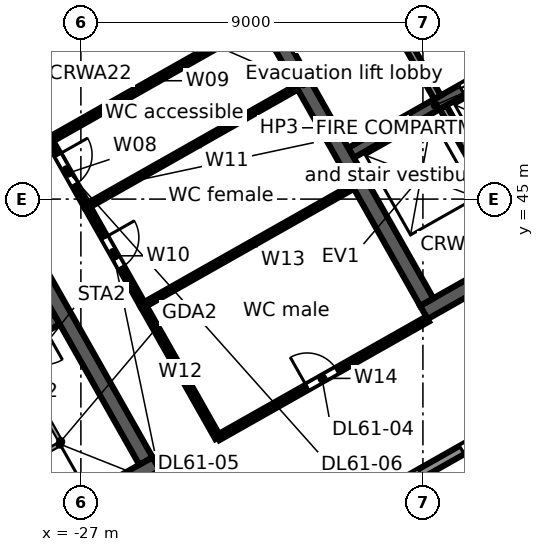
"""IFC4 building model, lengths in metres.
Left out: names, types, materials, properties, quantities, classifications, styles, units other than length and angle.
Written with IfcOpenShell. Run it as: python <this file> out.ifc"""

import sys

from ifc_helpers import new_model, si_unit, direction, frame, frame_2d, origin, place, context, subcontext, project, spatial, rectangle, extrude, element, fill, save


model = new_model("IFC4")
c1 = context("Model", 3, precision=1e-05, world=origin(), true_north=direction((0.0, 1.0)))
c2 = subcontext(c1, "Body", "Model", "MODEL_VIEW")
j1 = project(units=[si_unit("LENGTHUNIT", "METRE"), si_unit("PLANEANGLEUNIT", "RADIAN")], contexts=[c1])
p1 = place(None, origin())
s1 = spatial("IfcSite", under=j1, at=p1, CompositionType="ELEMENT")
p2 = place(p1, origin())
s2 = spatial("IfcBuilding", under=s1, at=p2, CompositionType="ELEMENT")
p3 = place(p2, frame((0.0, 0.0, 281.7)))
s3 = spatial("IfcBuildingStorey", under=s2, at=p3, CompositionType="ELEMENT", Elevation=281.7)
p4 = place(p3, frame((-58.732, 38.771, 0.0), z_axis=(0.0, 0.0, 1.0), x_axis=(0.870355615581, 0.492423702137, 0.0)))
e1 = element("IfcWall", 1, at=p4, inside=s3, PredefinedType="STANDARD", context=c2, shape_type="SweptSolid", body=[
    extrude(rectangle(XDim=64.052, YDim=0.25, at=frame_2d((32.026, 0.0))), origin(), (0.0, 0.0, 1.0), 3.45),
])
p5 = place(p4, frame((61.259, 0.0, 0.8)))
e2 = element("IfcOpeningElement", 2, at=p5, cuts=e1, PredefinedType="OPENING", context=c2, shape_type="SweptSolid", body=[
    extrude(rectangle(XDim=2.4, YDim=2.2, at=frame_2d((1.2, 1.1))), frame((0.0, 0.135, 0.0), z_axis=(0.0, -1.0, 0.0), x_axis=(1.0, 0.0, 0.0)), (0.0, 0.0, 1.0), 0.27),
])
p6 = place(p4, frame((58.216, 0.0, 0.8)))
e3 = element("IfcOpeningElement", 3, at=p6, cuts=e1, PredefinedType="OPENING", context=c2, shape_type="SweptSolid", body=[
    extrude(rectangle(XDim=2.4, YDim=2.2, at=frame_2d((1.2, 1.1))), frame((0.0, 0.135, 0.0), z_axis=(0.0, -1.0, 0.0), x_axis=(1.0, 0.0, 0.0)), (0.0, 0.0, 1.0), 0.27),
])
p7 = place(p4, frame((55.173, 0.0, 0.8)))
e4 = element("IfcOpeningElement", 4, at=p7, cuts=e1, PredefinedType="OPENING", context=c2, shape_type="SweptSolid", body=[
    extrude(rectangle(XDim=2.4, YDim=2.2, at=frame_2d((1.2, 1.1))), frame((0.0, 0.135, 0.0), z_axis=(0.0, -1.0, 0.0), x_axis=(1.0, 0.0, 0.0)), (0.0, 0.0, 1.0), 0.27),
])
p8 = place(p4, frame((52.129, 0.0, 0.8)))
e5 = element("IfcOpeningElement", 5, at=p8, cuts=e1, PredefinedType="OPENING", context=c2, shape_type="SweptSolid", body=[
    extrude(rectangle(XDim=2.4, YDim=2.2, at=frame_2d((1.2, 1.1))), frame((0.0, 0.135, 0.0), z_axis=(0.0, -1.0, 0.0), x_axis=(1.0, 0.0, 0.0)), (0.0, 0.0, 1.0), 0.27),
])
p9 = place(p4, frame((49.086, 0.0, 0.8)))
e6 = element("IfcOpeningElement", 6, at=p9, cuts=e1, PredefinedType="OPENING", context=c2, shape_type="SweptSolid", body=[
    extrude(rectangle(XDim=2.4, YDim=2.2, at=frame_2d((1.2, 1.1))), frame((0.0, 0.135, 0.0), z_axis=(0.0, -1.0, 0.0), x_axis=(1.0, 0.0, 0.0)), (0.0, 0.0, 1.0), 0.27),
])
p10 = place(p4, frame((46.043, 0.0, 0.8)))
e7 = element("IfcOpeningElement", 7, at=p10, cuts=e1, PredefinedType="OPENING", context=c2, shape_type="SweptSolid", body=[
    extrude(rectangle(XDim=2.4, YDim=2.2, at=frame_2d((1.2, 1.1))), frame((0.0, 0.135, 0.0), z_axis=(0.0, -1.0, 0.0), x_axis=(1.0, 0.0, 0.0)), (0.0, 0.0, 1.0), 0.27),
])
p11 = place(p4, frame((43.0, 0.0, 0.8)))
e8 = element("IfcOpeningElement", 8, at=p11, cuts=e1, PredefinedType="OPENING", context=c2, shape_type="SweptSolid", body=[
    extrude(rectangle(XDim=2.4, YDim=2.2, at=frame_2d((1.2, 1.1))), frame((0.0, 0.135, 0.0), z_axis=(0.0, -1.0, 0.0), x_axis=(1.0, 0.0, 0.0)), (0.0, 0.0, 1.0), 0.27),
])
p12 = place(p4, frame((39.956, 0.0, 0.8)))
e9 = element("IfcOpeningElement", 9, at=p12, cuts=e1, PredefinedType="OPENING", context=c2, shape_type="SweptSolid", body=[
    extrude(rectangle(XDim=2.4, YDim=2.2, at=frame_2d((1.2, 1.1))), frame((0.0, 0.135, 0.0), z_axis=(0.0, -1.0, 0.0), x_axis=(1.0, 0.0, 0.0)), (0.0, 0.0, 1.0), 0.27),
])
p13 = place(p4, frame((36.913, 0.0, 0.8)))
e10 = element("IfcOpeningElement", 10, at=p13, cuts=e1, PredefinedType="OPENING", context=c2, shape_type="SweptSolid", body=[
    extrude(rectangle(XDim=2.4, YDim=2.2, at=frame_2d((1.2, 1.1))), frame((0.0, 0.135, 0.0), z_axis=(0.0, -1.0, 0.0), x_axis=(1.0, 0.0, 0.0)), (0.0, 0.0, 1.0), 0.27),
])
p14 = place(p4, frame((33.87, 0.0, 0.8)))
e11 = element("IfcOpeningElement", 11, at=p14, cuts=e1, PredefinedType="OPENING", context=c2, shape_type="SweptSolid", body=[
    extrude(rectangle(XDim=2.4, YDim=2.2, at=frame_2d((1.2, 1.1))), frame((0.0, 0.135, 0.0), z_axis=(0.0, -1.0, 0.0), x_axis=(1.0, 0.0, 0.0)), (0.0, 0.0, 1.0), 0.27),
])
p15 = place(p4, frame((30.826, 0.0, 0.8)))
e12 = element("IfcOpeningElement", 12, at=p15, cuts=e1, PredefinedType="OPENING", context=c2, shape_type="SweptSolid", body=[
    extrude(rectangle(XDim=2.4, YDim=2.2, at=frame_2d((1.2, 1.1))), frame((0.0, 0.135, 0.0), z_axis=(0.0, -1.0, 0.0), x_axis=(1.0, 0.0, 0.0)), (0.0, 0.0, 1.0), 0.27),
])
p16 = place(p4, frame((27.783, 0.0, 0.8)))
e13 = element("IfcOpeningElement", 13, at=p16, cuts=e1, PredefinedType="OPENING", context=c2, shape_type="SweptSolid", body=[
    extrude(rectangle(XDim=2.4, YDim=2.2, at=frame_2d((1.2, 1.1))), frame((0.0, 0.135, 0.0), z_axis=(0.0, -1.0, 0.0), x_axis=(1.0, 0.0, 0.0)), (0.0, 0.0, 1.0), 0.27),
])
p17 = place(p4, frame((24.74, 0.0, 0.8)))
e14 = element("IfcOpeningElement", 14, at=p17, cuts=e1, PredefinedType="OPENING", context=c2, shape_type="SweptSolid", body=[
    extrude(rectangle(XDim=2.4, YDim=2.2, at=frame_2d((1.2, 1.1))), frame((0.0, 0.135, 0.0), z_axis=(0.0, -1.0, 0.0), x_axis=(1.0, 0.0, 0.0)), (0.0, 0.0, 1.0), 0.27),
])
p18 = place(p4, frame((21.696, 0.0, 0.8)))
e15 = element("IfcOpeningElement", 15, at=p18, cuts=e1, PredefinedType="OPENING", context=c2, shape_type="SweptSolid", body=[
    extrude(rectangle(XDim=2.4, YDim=2.2, at=frame_2d((1.2, 1.1))), frame((0.0, 0.135, 0.0), z_axis=(0.0, -1.0, 0.0), x_axis=(1.0, 0.0, 0.0)), (0.0, 0.0, 1.0), 0.27),
])
p19 = place(p4, frame((18.653, 0.0, 0.8)))
e16 = element("IfcOpeningElement", 16, at=p19, cuts=e1, PredefinedType="OPENING", context=c2, shape_type="SweptSolid", body=[
    extrude(rectangle(XDim=2.4, YDim=2.2, at=frame_2d((1.2, 1.1))), frame((0.0, 0.135, 0.0), z_axis=(0.0, -1.0, 0.0), x_axis=(1.0, 0.0, 0.0)), (0.0, 0.0, 1.0), 0.27),
])
p20 = place(p4, frame((15.61, 0.0, 0.8)))
e17 = element("IfcOpeningElement", 17, at=p20, cuts=e1, PredefinedType="OPENING", context=c2, shape_type="SweptSolid", body=[
    extrude(rectangle(XDim=2.4, YDim=2.2, at=frame_2d((1.2, 1.1))), frame((0.0, 0.135, 0.0), z_axis=(0.0, -1.0, 0.0), x_axis=(1.0, 0.0, 0.0)), (0.0, 0.0, 1.0), 0.27),
])
p21 = place(p4, frame((12.567, 0.0, 0.8)))
e18 = element("IfcOpeningElement", 18, at=p21, cuts=e1, PredefinedType="OPENING", context=c2, shape_type="SweptSolid", body=[
    extrude(rectangle(XDim=2.4, YDim=2.2, at=frame_2d((1.2, 1.1))), frame((0.0, 0.135, 0.0), z_axis=(0.0, -1.0, 0.0), x_axis=(1.0, 0.0, 0.0)), (0.0, 0.0, 1.0), 0.27),
])
p22 = place(p4, frame((9.523, 0.0, 0.8)))
e19 = element("IfcOpeningElement", 19, at=p22, cuts=e1, PredefinedType="OPENING", context=c2, shape_type="SweptSolid", body=[
    extrude(rectangle(XDim=2.4, YDim=2.2, at=frame_2d((1.2, 1.1))), frame((0.0, 0.135, 0.0), z_axis=(0.0, -1.0, 0.0), x_axis=(1.0, 0.0, 0.0)), (0.0, 0.0, 1.0), 0.27),
])
p23 = place(p4, frame((6.48, 0.0, 0.8)))
e20 = element("IfcOpeningElement", 20, at=p23, cuts=e1, PredefinedType="OPENING", context=c2, shape_type="SweptSolid", body=[
    extrude(rectangle(XDim=2.4, YDim=2.2, at=frame_2d((1.2, 1.1))), frame((0.0, 0.135, 0.0), z_axis=(0.0, -1.0, 0.0), x_axis=(1.0, 0.0, 0.0)), (0.0, 0.0, 1.0), 0.27),
])
p24 = place(p4, frame((3.437, 0.0, 0.8)))
e21 = element("IfcOpeningElement", 21, at=p24, cuts=e1, PredefinedType="OPENING", context=c2, shape_type="SweptSolid", body=[
    extrude(rectangle(XDim=2.4, YDim=2.2, at=frame_2d((1.2, 1.1))), frame((0.0, 0.135, 0.0), z_axis=(0.0, -1.0, 0.0), x_axis=(1.0, 0.0, 0.0)), (0.0, 0.0, 1.0), 0.27),
])
p25 = place(p4, frame((0.393, 0.0, 0.8)))
e22 = element("IfcOpeningElement", 22, at=p25, cuts=e1, PredefinedType="OPENING", context=c2, shape_type="SweptSolid", body=[
    extrude(rectangle(XDim=2.4, YDim=2.2, at=frame_2d((1.2, 1.1))), frame((0.0, 0.135, 0.0), z_axis=(0.0, -1.0, 0.0), x_axis=(1.0, 0.0, 0.0)), (0.0, 0.0, 1.0), 0.27),
])
p26 = place(p3, frame((-3.017, 46.293, 0.0), z_axis=(0.0, 0.0, 1.0), x_axis=(-0.870355474887, -0.492423950812, 0.0)))
e23 = element("IfcWall", 23, at=p26, inside=s3, PredefinedType="STANDARD", context=c2, shape_type="SweptSolid", body=[
    extrude(rectangle(XDim=40.34, YDim=0.25, at=frame_2d((20.17, 0.0))), origin(), (0.0, 0.0, 1.0), 3.45),
])
p27 = place(p26, frame((37.428, 0.0, 0.8)))
e24 = element("IfcOpeningElement", 24, at=p27, cuts=e23, PredefinedType="OPENING", context=c2, shape_type="SweptSolid", body=[
    extrude(rectangle(XDim=2.4, YDim=2.2, at=frame_2d((1.2, 1.1))), frame((0.0, 0.135, 0.0), z_axis=(0.0, -1.0, 0.0), x_axis=(1.0, 0.0, 0.0)), (0.0, 0.0, 1.0), 0.27),
])
p28 = place(p26, frame((34.372, 0.0, 0.0)))
e25 = element("IfcOpeningElement", 25, at=p28, cuts=e23, PredefinedType="OPENING", context=c2, shape_type="SweptSolid", body=[
    extrude(rectangle(XDim=1.8, YDim=2.4, at=frame_2d((0.9, 1.2))), frame((0.0, 0.135, 0.0), z_axis=(0.0, -1.0, 0.0), x_axis=(1.0, 0.0, 0.0)), (0.0, 0.0, 1.0), 0.27),
])
p29 = place(p26, frame((30.716, 0.0, 0.8)))
e26 = element("IfcOpeningElement", 26, at=p29, cuts=e23, PredefinedType="OPENING", context=c2, shape_type="SweptSolid", body=[
    extrude(rectangle(XDim=2.4, YDim=2.2, at=frame_2d((1.2, 1.1))), frame((0.0, 0.135, 0.0), z_axis=(0.0, -1.0, 0.0), x_axis=(1.0, 0.0, 0.0)), (0.0, 0.0, 1.0), 0.27),
])
p30 = place(p26, frame((27.36, 0.0, 0.8)))
e27 = element("IfcOpeningElement", 27, at=p30, cuts=e23, PredefinedType="OPENING", context=c2, shape_type="SweptSolid", body=[
    extrude(rectangle(XDim=2.4, YDim=2.2, at=frame_2d((1.2, 1.1))), frame((0.0, 0.135, 0.0), z_axis=(0.0, -1.0, 0.0), x_axis=(1.0, 0.0, 0.0)), (0.0, 0.0, 1.0), 0.27),
])
p31 = place(p26, frame((24.304, 0.0, 0.0)))
e28 = element("IfcOpeningElement", 28, at=p31, cuts=e23, PredefinedType="OPENING", context=c2, shape_type="SweptSolid", body=[
    extrude(rectangle(XDim=1.8, YDim=2.4, at=frame_2d((0.9, 1.2))), frame((0.0, 0.135, 0.0), z_axis=(0.0, -1.0, 0.0), x_axis=(1.0, 0.0, 0.0)), (0.0, 0.0, 1.0), 0.27),
])
p32 = place(p26, frame((20.648, 0.0, 0.8)))
e29 = element("IfcOpeningElement", 29, at=p32, cuts=e23, PredefinedType="OPENING", context=c2, shape_type="SweptSolid", body=[
    extrude(rectangle(XDim=2.4, YDim=2.2, at=frame_2d((1.2, 1.1))), frame((0.0, 0.135, 0.0), z_axis=(0.0, -1.0, 0.0), x_axis=(1.0, 0.0, 0.0)), (0.0, 0.0, 1.0), 0.27),
])
p33 = place(p26, frame((17.292, 0.0, 0.8)))
e30 = element("IfcOpeningElement", 30, at=p33, cuts=e23, PredefinedType="OPENING", context=c2, shape_type="SweptSolid", body=[
    extrude(rectangle(XDim=2.4, YDim=2.2, at=frame_2d((1.2, 1.1))), frame((0.0, 0.135, 0.0), z_axis=(0.0, -1.0, 0.0), x_axis=(1.0, 0.0, 0.0)), (0.0, 0.0, 1.0), 0.27),
])
p34 = place(p26, frame((14.236, 0.0, 0.0)))
e31 = element("IfcOpeningElement", 31, at=p34, cuts=e23, PredefinedType="OPENING", context=c2, shape_type="SweptSolid", body=[
    extrude(rectangle(XDim=1.8, YDim=2.4, at=frame_2d((0.9, 1.2))), frame((0.0, 0.135, 0.0), z_axis=(0.0, -1.0, 0.0), x_axis=(1.0, 0.0, 0.0)), (0.0, 0.0, 1.0), 0.27),
])
p35 = place(p26, frame((10.58, 0.0, 0.8)))
e32 = element("IfcOpeningElement", 32, at=p35, cuts=e23, PredefinedType="OPENING", context=c2, shape_type="SweptSolid", body=[
    extrude(rectangle(XDim=2.4, YDim=2.2, at=frame_2d((1.2, 1.1))), frame((0.0, 0.135, 0.0), z_axis=(0.0, -1.0, 0.0), x_axis=(1.0, 0.0, 0.0)), (0.0, 0.0, 1.0), 0.27),
])
p36 = place(p26, frame((7.224, 0.0, 0.8)))
e33 = element("IfcOpeningElement", 33, at=p36, cuts=e23, PredefinedType="OPENING", context=c2, shape_type="SweptSolid", body=[
    extrude(rectangle(XDim=2.4, YDim=2.2, at=frame_2d((1.2, 1.1))), frame((0.0, 0.135, 0.0), z_axis=(0.0, -1.0, 0.0), x_axis=(1.0, 0.0, 0.0)), (0.0, 0.0, 1.0), 0.27),
])
p37 = place(p26, frame((4.168, 0.0, 0.0)))
e34 = element("IfcOpeningElement", 34, at=p37, cuts=e23, PredefinedType="OPENING", context=c2, shape_type="SweptSolid", body=[
    extrude(rectangle(XDim=1.8, YDim=2.4, at=frame_2d((0.9, 1.2))), frame((0.0, 0.135, 0.0), z_axis=(0.0, -1.0, 0.0), x_axis=(1.0, 0.0, 0.0)), (0.0, 0.0, 1.0), 0.27),
])
p38 = place(p26, frame((0.512, 0.0, 0.8)))
e35 = element("IfcOpeningElement", 35, at=p38, cuts=e23, PredefinedType="OPENING", context=c2, shape_type="SweptSolid", body=[
    extrude(rectangle(XDim=2.4, YDim=2.2, at=frame_2d((1.2, 1.1))), frame((0.0, 0.135, 0.0), z_axis=(0.0, -1.0, 0.0), x_axis=(1.0, 0.0, 0.0)), (0.0, 0.0, 1.0), 0.27),
])
p39 = place(p3, frame((-39.813, 29.662, 0.0), z_axis=(0.0, 0.0, 1.0), x_axis=(0.870350116061, 0.492433422375, 0.0)))
e36 = element("IfcWall", 36, at=p39, inside=s3, PredefinedType="SOLIDWALL", context=c2, shape_type="SweptSolid", body=[
    extrude(rectangle(XDim=17.0, YDim=0.4, at=frame_2d((8.5, 0.0))), origin(), (0.0, 0.0, 1.0), 3.45),
])
p40 = place(p39, frame((7.2, 0.0, 0.0)))
e37 = element("IfcOpeningElement", 37, at=p40, cuts=e36, PredefinedType="OPENING", context=c2, shape_type="SweptSolid", body=[
    extrude(rectangle(XDim=1.2, YDim=2.1, at=frame_2d((0.6, 1.05))), frame((0.0, 0.21, 0.0), z_axis=(0.0, -1.0, 0.0), x_axis=(1.0, 0.0, 0.0)), (0.0, 0.0, 1.0), 0.42),
])
p41 = place(p3, frame((-34.245, 38.097, 0.0), z_axis=(0.0, 0.0, 1.0), x_axis=(0.870356351998, 0.492422400523, 0.0)))
e38 = element("IfcWall", 38, at=p41, inside=s3, PredefinedType="SOLIDWALL", context=c2, shape_type="SweptSolid", body=[
    extrude(rectangle(XDim=7.6, YDim=0.3, at=frame_2d((3.8, 0.0))), origin(), (0.0, 0.0, 1.0), 3.45),
])
p42 = place(p41, frame((6.2, 0.0, 0.0)))
e39 = element("IfcOpeningElement", 39, at=p42, cuts=e38, PredefinedType="OPENING", context=c2, shape_type="SweptSolid", body=[
    extrude(rectangle(XDim=1.0, YDim=2.1, at=frame_2d((0.5, 1.05))), frame((0.0, 0.16, 0.0), z_axis=(0.0, -1.0, 0.0), x_axis=(1.0, 0.0, 0.0)), (0.0, 0.0, 1.0), 0.32),
])
p43 = place(p3, frame((-31.79, 49.597, 0.0), z_axis=(0.0, 0.0, 1.0), x_axis=(0.492421663121, -0.870356769198, 0.0)))
e40 = element("IfcWall", 40, at=p43, inside=s3, PredefinedType="SOLIDWALL", context=c2, shape_type="SweptSolid", body=[
    extrude(rectangle(XDim=13.2, YDim=0.4, at=frame_2d((6.6, 0.0))), origin(), (0.0, 0.0, 1.0), 3.45),
])
p44 = place(p3, frame((-17.975, 42.017, 0.0), z_axis=(0.0, 0.0, 1.0), x_axis=(0.87034965173, 0.492434243055, 0.0)))
e41 = element("IfcWall", 41, at=p44, inside=s3, PredefinedType="SOLIDWALL", context=c2, shape_type="SweptSolid", body=[
    extrude(rectangle(XDim=15.0, YDim=0.4, at=frame_2d((7.5, 0.0))), origin(), (0.0, 0.0, 1.0), 3.45),
])
p45 = place(p44, frame((6.1, 0.0, 0.0)))
e42 = element("IfcOpeningElement", 42, at=p45, cuts=e41, PredefinedType="OPENING", context=c2, shape_type="SweptSolid", body=[
    extrude(rectangle(XDim=1.2, YDim=2.1, at=frame_2d((0.6, 1.05))), frame((0.0, 0.21, 0.0), z_axis=(0.0, -1.0, 0.0), x_axis=(1.0, 0.0, 0.0)), (0.0, 0.0, 1.0), 0.42),
])
p46 = place(p3, frame((-19.892, 46.218, 0.0), z_axis=(0.0, 0.0, 1.0), x_axis=(0.870341639186, 0.492448404505, 0.0)))
e43 = element("IfcWall", 43, at=p46, inside=s3, PredefinedType="SOLIDWALL", context=c2, shape_type="SweptSolid", body=[
    extrude(rectangle(XDim=5.1, YDim=0.3, at=frame_2d((2.55, 0.0))), origin(), (0.0, 0.0, 1.0), 3.45),
])
p47 = place(p46, frame((0.75, 0.0, 0.0)))
e44 = element("IfcOpeningElement", 44, at=p47, cuts=e43, PredefinedType="OPENING", context=c2, shape_type="SweptSolid", body=[
    extrude(rectangle(XDim=1.1, YDim=2.1, at=frame_2d((0.55, 1.05))), frame((0.0, 0.16, 0.0), z_axis=(0.0, -1.0, 0.0), x_axis=(1.0, 0.0, 0.0)), (0.0, 0.0, 1.0), 0.32),
])
p48 = place(p46, frame((3.35, 0.0, 0.0)))
e45 = element("IfcOpeningElement", 45, at=p48, cuts=e43, PredefinedType="OPENING", context=c2, shape_type="SweptSolid", body=[
    extrude(rectangle(XDim=1.1, YDim=2.1, at=frame_2d((0.55, 1.05))), frame((0.0, 0.16, 0.0), z_axis=(0.0, -1.0, 0.0), x_axis=(1.0, 0.0, 0.0)), (0.0, 0.0, 1.0), 0.32),
])
p49 = place(p3, frame((-24.4, 53.779, 0.0), z_axis=(0.0, 0.0, 1.0), x_axis=(0.492421663121, -0.870356769198, 0.0)))
e46 = element("IfcWall", 46, at=p49, inside=s3, PredefinedType="SOLIDWALL", context=c2, shape_type="SweptSolid", body=[
    extrude(rectangle(XDim=13.2, YDim=0.4, at=frame_2d((6.6, 0.0))), origin(), (0.0, 0.0, 1.0), 3.45),
])
p50 = place(p3, frame((-17.469, 47.417, 0.0), z_axis=(0.0, 0.0, 1.0), x_axis=(0.492466057713, -0.870331650579, 0.0)))
e47 = element("IfcWall", 47, at=p50, inside=s3, PredefinedType="SOLIDWALL", context=c2, shape_type="SweptSolid", body=[
    extrude(rectangle(XDim=4.25, YDim=0.2, at=frame_2d((2.125, 0.0))), origin(), (0.0, 0.0, 1.0), 3.45),
])
p51 = place(p3, frame((-19.635, 51.246, 0.0), z_axis=(0.0, 0.0, 1.0), x_axis=(0.492408451753, -0.87036424366, 0.0)))
e48 = element("IfcWall", 48, at=p51, inside=s3, PredefinedType="PARTITIONING", context=c2, shape_type="SweptSolid", body=[
    extrude(rectangle(XDim=4.1, YDim=0.2, at=frame_2d((2.05, 0.0))), origin(), (0.0, 0.0, 1.0), 3.45),
])
p52 = place(p51, frame((1.55, 0.0, 0.0)))
e49 = element("IfcOpeningElement", 49, at=p52, cuts=e48, PredefinedType="OPENING", context=c2, shape_type="SweptSolid", body=[
    extrude(rectangle(XDim=1.0, YDim=2.1, at=frame_2d((0.5, 1.05))), frame((0.0, 0.11, 0.0), z_axis=(0.0, -1.0, 0.0), x_axis=(1.0, 0.0, 0.0)), (0.0, 0.0, 1.0), 0.22),
])
p53 = place(p3, frame((-27.827, 46.554, 0.0), z_axis=(0.0, 0.0, 1.0), x_axis=(0.492374954878, -0.870383193662, 0.0)))
e50 = element("IfcWall", 50, at=p53, inside=s3, PredefinedType="PARTITIONING", context=c2, shape_type="SweptSolid", body=[
    extrude(rectangle(XDim=2.0, YDim=0.15, at=frame_2d((1.0, 0.0))), origin(), (0.0, 0.0, 1.0), 2.622),
])
p54 = place(p53, frame((0.45, 0.0, 0.0)))
e51 = element("IfcOpeningElement", 51, at=p54, cuts=e50, PredefinedType="OPENING", context=c2, shape_type="SweptSolid", body=[
    extrude(rectangle(XDim=0.9, YDim=2.1, at=frame_2d((0.45, 1.05))), frame((0.0, 0.085, 0.0), z_axis=(0.0, -1.0, 0.0), x_axis=(1.0, 0.0, 0.0)), (0.0, 0.0, 1.0), 0.17),
])
p55 = place(p3, frame((-27.827, 46.554, 0.0), z_axis=(0.0, 0.0, 1.0), x_axis=(0.870339695563, 0.492451839602, 0.0)))
e52 = element("IfcWall", 52, at=p55, inside=s3, PredefinedType="PARTITIONING", context=c2, shape_type="SweptSolid", body=[
    extrude(rectangle(XDim=6.34, YDim=0.15, at=frame_2d((3.17, 0.0))), origin(), (0.0, 0.0, 1.0), 2.622),
])
p56 = place(p3, frame((-26.842, 44.813, 0.0), z_axis=(0.0, 0.0, 1.0), x_axis=(0.492365617434, -0.870388475779, 0.0)))
e53 = element("IfcWall", 53, at=p56, inside=s3, PredefinedType="PARTITIONING", context=c2, shape_type="SweptSolid", body=[
    extrude(rectangle(XDim=3.0, YDim=0.15, at=frame_2d((1.5, 0.0))), origin(), (0.0, 0.0, 1.0), 2.622),
])
p57 = place(p56, frame((0.95, 0.0, 0.0)))
e54 = element("IfcOpeningElement", 54, at=p57, cuts=e53, PredefinedType="OPENING", context=c2, shape_type="SweptSolid", body=[
    extrude(rectangle(XDim=0.9, YDim=2.1, at=frame_2d((0.45, 1.05))), frame((0.0, 0.085, 0.0), z_axis=(0.0, -1.0, 0.0), x_axis=(1.0, 0.0, 0.0)), (0.0, 0.0, 1.0), 0.17),
])
p58 = place(p3, frame((-26.842, 44.813, 0.0), z_axis=(0.0, 0.0, 1.0), x_axis=(0.870283015025, 0.492552001071, 0.0)))
e55 = element("IfcWall", 55, at=p58, inside=s3, PredefinedType="PARTITIONING", context=c2, shape_type="SweptSolid", body=[
    extrude(rectangle(XDim=6.341, YDim=0.125, at=frame_2d((3.17, 0.0))), origin(), (0.0, 0.0, 1.0), 2.622),
])
p59 = place(p3, frame((-25.365, 42.202, 0.0), z_axis=(0.0, 0.0, 1.0), x_axis=(0.492525823506, -0.870297830159, 0.0)))
e56 = element("IfcWall", 56, at=p59, inside=s3, PredefinedType="PARTITIONING", context=c2, shape_type="SweptSolid", body=[
    extrude(rectangle(XDim=4.0, YDim=0.15, at=frame_2d((2.0, 0.0))), origin(), (0.0, 0.0, 1.0), 3.45),
])
p60 = place(p3, frame((-25.365, 42.202, 0.0), z_axis=(0.0, 0.0, 1.0), x_axis=(0.870320373616, 0.492485986875, 0.0)))
e57 = element("IfcWall", 57, at=p60, inside=s3, PredefinedType="PARTITIONING", context=c2, shape_type="SweptSolid", body=[
    extrude(rectangle(XDim=6.341, YDim=0.125, at=frame_2d((3.171, 0.0))), origin(), (0.0, 0.0, 1.0), 3.45),
])
p61 = place(p3, frame((-23.395, 38.721, 0.0), z_axis=(0.0, 0.0, 1.0), x_axis=(0.870349033841, 0.492435335137, 0.0)))
e58 = element("IfcWall", 58, at=p61, inside=s3, PredefinedType="PARTITIONING", context=c2, shape_type="SweptSolid", body=[
    extrude(rectangle(XDim=6.34, YDim=0.15, at=frame_2d((3.17, 0.0))), origin(), (0.0, 0.0, 1.0), 3.45),
])
p62 = place(p61, frame((2.7, 0.0, 0.0)))
e59 = element("IfcOpeningElement", 59, at=p62, cuts=e58, PredefinedType="OPENING", context=c2, shape_type="SweptSolid", body=[
    extrude(rectangle(XDim=0.9, YDim=2.1, at=frame_2d((0.45, 1.05))), frame((0.0, 0.085, 0.0), z_axis=(0.0, -1.0, 0.0), x_axis=(1.0, 0.0, 0.0)), (0.0, 0.0, 1.0), 0.17),
])
p63 = place(p34, origin())
e60 = element("IfcDoor", 60, at=p63, inside=s3, OperationType="DOUBLE_DOOR_SINGLE_SWING", PredefinedType="DOOR", context=c2, shape_type="SweptSolid", body=[
    extrude(rectangle(XDim=1.8, YDim=2.4, at=frame_2d((0.9, 1.2))), frame((0.0, 0.025, 0.0), z_axis=(0.0, -1.0, 0.0), x_axis=(1.0, 0.0, 0.0)), (0.0, 0.0, 1.0), 0.05),
])
fill(e31, e60)
p64 = place(p47, origin())
e61 = element("IfcDoor", 61, at=p64, inside=s3, OperationType="DOUBLE_DOOR_SLIDING", PredefinedType="DOOR", context=c2, shape_type="SweptSolid", body=[
    extrude(rectangle(XDim=1.1, YDim=2.1, at=frame_2d((0.55, 1.05))), frame((0.0, 0.025, 0.0), z_axis=(0.0, -1.0, 0.0), x_axis=(1.0, 0.0, 0.0)), (0.0, 0.0, 1.0), 0.05),
])
fill(e44, e61)
p65 = place(p48, origin())
e62 = element("IfcDoor", 62, at=p65, inside=s3, OperationType="DOUBLE_DOOR_SLIDING", PredefinedType="DOOR", context=c2, shape_type="SweptSolid", body=[
    extrude(rectangle(XDim=1.1, YDim=2.1, at=frame_2d((0.55, 1.05))), frame((0.0, 0.025, 0.0), z_axis=(0.0, -1.0, 0.0), x_axis=(1.0, 0.0, 0.0)), (0.0, 0.0, 1.0), 0.05),
])
fill(e45, e62)
p66 = place(p62, origin())
e63 = element("IfcDoor", 63, at=p66, inside=s3, OperationType="SINGLE_SWING_LEFT", PredefinedType="DOOR", context=c2, shape_type="SweptSolid", body=[
    extrude(rectangle(XDim=0.9, YDim=2.1, at=frame_2d((0.45, 1.05))), frame((0.0, 0.025, 0.0), z_axis=(0.0, -1.0, 0.0), x_axis=(1.0, 0.0, 0.0)), (0.0, 0.0, 1.0), 0.05),
])
fill(e59, e63)
p67 = place(p57, origin())
e64 = element("IfcDoor", 64, at=p67, inside=s3, OperationType="SINGLE_SWING_LEFT", PredefinedType="DOOR", context=c2, shape_type="SweptSolid", body=[
    extrude(rectangle(XDim=0.9, YDim=2.1, at=frame_2d((0.45, 1.05))), frame((0.0, 0.025, 0.0), z_axis=(0.0, -1.0, 0.0), x_axis=(1.0, 0.0, 0.0)), (0.0, 0.0, 1.0), 0.05),
])
fill(e54, e64)
p68 = place(p54, origin())
e65 = element("IfcDoor", 65, at=p68, inside=s3, OperationType="SINGLE_SWING_LEFT", PredefinedType="DOOR", context=c2, shape_type="SweptSolid", body=[
    extrude(rectangle(XDim=0.9, YDim=2.1, at=frame_2d((0.45, 1.05))), frame((0.0, 0.025, 0.0), z_axis=(0.0, -1.0, 0.0), x_axis=(1.0, 0.0, 0.0)), (0.0, 0.0, 1.0), 0.05),
])
fill(e51, e65)
save(model, sys.argv[1])
